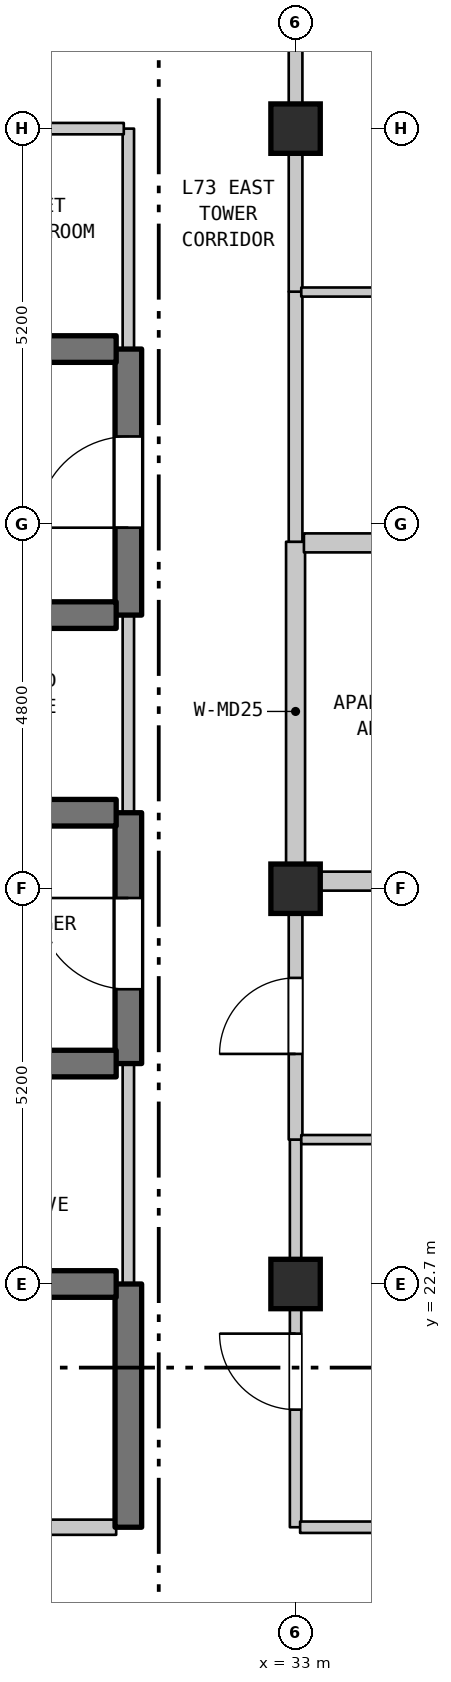
"""IFC4 building model, lengths in metres.
Left out: names, types, materials, properties, quantities, classifications, styles, units other than length and angle.
Written with IfcOpenShell. Run it as: python <this file> out.ifc"""

import sys

from ifc_helpers import new_model, si_unit, direction, frame, frame_2d, origin, origin_2d, place, context, subcontext, project, spatial, rectangle, extrude, element, fill, save


model = new_model("IFC4")
c1 = context("Model", 3, precision=1e-05, world=origin(), true_north=direction((0.0, 1.0)))
c2 = subcontext(c1, "Body", "Model", "MODEL_VIEW")
j1 = project(units=[si_unit("LENGTHUNIT", "METRE"), si_unit("PLANEANGLEUNIT", "RADIAN")], contexts=[c1])
p1 = place(None, origin())
s1 = spatial("IfcSite", under=j1, at=p1, CompositionType="ELEMENT")
p2 = place(p1, origin())
s2 = spatial("IfcBuilding", under=s1, at=p2, CompositionType="ELEMENT")
p3 = place(p2, frame((0.0, 0.0, 291.7)))
s3 = spatial("IfcBuildingStorey", under=s2, at=p3, CompositionType="ELEMENT", Elevation=291.7)
for number, where, z_axis, x_axis in (
    (1, (33.0, 22.7, 0.0), (0.0, 0.0, 1.0), (1.0, 0.0, 0.0)),
    (2, (33.0, 27.9, 0.0), (0.0, 0.0, 1.0), (1.0, 0.0, 0.0)),
    (3, (33.0, 37.9, 0.0), (0.0, 0.0, 1.0), (1.0, 0.0, 0.0)),
):
    element("IfcColumn", number, at=place(p3, frame(where, z_axis=z_axis, x_axis=x_axis)), inside=s3, PredefinedType="COLUMN", context=c2, shape_type="SweptSolid", body=[
        extrude(rectangle(XDim=0.65, YDim=0.65, at=origin_2d()), origin(), (0.0, 0.0, 1.0), 3.7),
    ])
p4 = place(p3, frame((30.8, 19.5, 0.0), z_axis=(0.0, 0.0, 1.0), x_axis=(0.0, 1.0, 0.0)))
e4 = element("IfcWall", 4, at=p4, inside=s3, PredefinedType="SHEAR", context=c2, shape_type="SweptSolid", body=[
    extrude(rectangle(XDim=3.2, YDim=0.35, at=frame_2d((1.6, 0.0))), origin(), (0.0, 0.0, 1.0), 3.39),
])
p5 = place(p3, frame((30.8, 22.7, 0.0), z_axis=(0.0, 0.0, 1.0), x_axis=(0.0, 1.0, 0.0)))
e5 = element("IfcWall", 5, at=p5, inside=s3, PredefinedType="STANDARD", context=c2, shape_type="SweptSolid", body=[
    extrude(rectangle(XDim=2.9, YDim=0.15, at=frame_2d((1.45, 0.0))), origin(), (0.0, 0.0, 1.0), 3.39),
])
p6 = place(p3, frame((30.8, 25.6, 0.0), z_axis=(0.0, 0.0, 1.0), x_axis=(0.0, 1.0, 0.0)))
e6 = element("IfcWall", 6, at=p6, inside=s3, PredefinedType="SHEAR", context=c2, shape_type="SweptSolid", body=[
    extrude(rectangle(XDim=3.3, YDim=0.35, at=frame_2d((1.65, 0.0))), origin(), (0.0, 0.0, 1.0), 3.39),
])
p7 = place(p6, frame((0.978, 0.0, 0.0)))
e7 = element("IfcOpeningElement", 7, at=p7, cuts=e6, PredefinedType="OPENING", context=c2, shape_type="SweptSolid", body=[
    extrude(rectangle(XDim=1.2, YDim=2.2, at=frame_2d((0.6, 1.1))), frame((0.0, 0.185, 0.0), z_axis=(0.0, -1.0, 0.0), x_axis=(1.0, 0.0, 0.0)), (0.0, 0.0, 1.0), 0.37),
])
p8 = place(p3, frame((30.8, 28.9, 0.0), z_axis=(0.0, 0.0, 1.0), x_axis=(0.0, 1.0, 0.0)))
e8 = element("IfcWall", 8, at=p8, inside=s3, PredefinedType="STANDARD", context=c2, shape_type="SweptSolid", body=[
    extrude(rectangle(XDim=2.6, YDim=0.15, at=frame_2d((1.3, 0.0))), origin(), (0.0, 0.0, 1.0), 3.39),
])
p9 = place(p3, frame((30.8, 31.5, 0.0), z_axis=(0.0, 0.0, 1.0), x_axis=(0.0, 1.0, 0.0)))
e9 = element("IfcWall", 9, at=p9, inside=s3, PredefinedType="SHEAR", context=c2, shape_type="SweptSolid", body=[
    extrude(rectangle(XDim=3.5, YDim=0.35, at=frame_2d((1.75, 0.0))), origin(), (0.0, 0.0, 1.0), 3.39),
])
p10 = place(p9, frame((1.15, 0.0, 0.0)))
e10 = element("IfcOpeningElement", 10, at=p10, cuts=e9, PredefinedType="OPENING", context=c2, shape_type="SweptSolid", body=[
    extrude(rectangle(XDim=1.2, YDim=2.2, at=frame_2d((0.6, 1.1))), frame((0.0, 0.185, 0.0), z_axis=(0.0, -1.0, 0.0), x_axis=(1.0, 0.0, 0.0)), (0.0, 0.0, 1.0), 0.37),
])
p11 = place(p3, frame((30.8, 35.0, 0.0), z_axis=(0.0, 0.0, 1.0), x_axis=(0.0, 1.0, 0.0)))
e11 = element("IfcWall", 11, at=p11, inside=s3, PredefinedType="STANDARD", context=c2, shape_type="SweptSolid", body=[
    extrude(rectangle(XDim=2.9, YDim=0.15, at=frame_2d((1.45, 0.0))), origin(), (0.0, 0.0, 1.0), 3.39),
])
p12 = place(p3, frame((33.0, 19.5, 0.0), z_axis=(0.0, 0.0, 1.0), x_axis=(0.0, 1.0, 0.0)))
e12 = element("IfcWall", 12, at=p12, inside=s3, PredefinedType="STANDARD", context=c2, shape_type="SweptSolid", body=[
    extrude(rectangle(XDim=5.1, YDim=0.15, at=frame_2d((2.55, 0.0))), origin(), (0.0, 0.0, 1.0), 3.1),
])
p13 = place(p12, frame((1.547, 0.0, 0.0)))
e13 = element("IfcOpeningElement", 13, at=p13, cuts=e12, PredefinedType="OPENING", context=c2, shape_type="SweptSolid", body=[
    extrude(rectangle(XDim=1.0, YDim=2.15, at=frame_2d((0.5, 1.075))), frame((0.0, 0.085, 0.0), z_axis=(0.0, -1.0, 0.0), x_axis=(1.0, 0.0, 0.0)), (0.0, 0.0, 1.0), 0.17),
])
p14 = place(p3, frame((33.0, 24.6, 0.0), z_axis=(0.0, 0.0, 1.0), x_axis=(0.0, 1.0, 0.0)))
e14 = element("IfcWall", 14, at=p14, inside=s3, PredefinedType="STANDARD", context=c2, shape_type="SweptSolid", body=[
    extrude(rectangle(XDim=3.4, YDim=0.18, at=frame_2d((1.7, 0.0))), origin(), (0.0, 0.0, 1.0), 3.1),
])
p15 = place(p14, frame((1.127, 0.0, 0.0)))
e15 = element("IfcOpeningElement", 15, at=p15, cuts=e14, PredefinedType="OPENING", context=c2, shape_type="SweptSolid", body=[
    extrude(rectangle(XDim=1.0, YDim=2.15, at=frame_2d((0.5, 1.075))), frame((0.0, 0.1, 0.0), z_axis=(0.0, -1.0, 0.0), x_axis=(1.0, 0.0, 0.0)), (0.0, 0.0, 1.0), 0.2),
])
p16 = place(p3, frame((33.0, 28.0, 0.0), z_axis=(0.0, 0.0, 1.0), x_axis=(0.0, 1.0, 0.0)))
e16 = element("IfcWall", 16, at=p16, inside=s3, PredefinedType="STANDARD", context=c2, shape_type="SweptSolid", body=[
    extrude(rectangle(XDim=4.465, YDim=0.25, at=frame_2d((2.232, 0.0))), origin(), (0.0, 0.0, 1.0), 2.89),
])
p17 = place(p3, frame((33.0, 32.465, 0.0), z_axis=(0.0, 0.0, 1.0), x_axis=(0.0, 1.0, 0.0)))
e17 = element("IfcWall", 17, at=p17, inside=s3, PredefinedType="STANDARD", context=c2, shape_type="SweptSolid", body=[
    extrude(rectangle(XDim=3.29, YDim=0.18, at=frame_2d((1.645, 0.0))), origin(), (0.0, 0.0, 1.0), 2.89),
])
p18 = place(p3, frame((33.0, 35.755, 0.0), z_axis=(0.0, 0.0, 1.0), x_axis=(0.0, 1.0, 0.0)))
e18 = element("IfcWall", 18, at=p18, inside=s3, PredefinedType="STANDARD", context=c2, shape_type="SweptSolid", body=[
    extrude(rectangle(XDim=2.145, YDim=0.18, at=frame_2d((1.073, 0.0))), origin(), (0.0, 0.0, 1.0), 2.89),
])
p19 = place(p3, frame((25.985, 19.5, 0.0), z_axis=(0.0, 0.0, 1.0), x_axis=(1.0, 0.0, 0.0)))
e19 = element("IfcWall", 19, at=p19, inside=s3, PredefinedType="STANDARD", context=c2, shape_type="SweptSolid", body=[
    extrude(rectangle(XDim=4.655, YDim=0.2, at=frame_2d((2.327, 0.0))), origin(), (0.0, 0.0, 1.0), 3.39),
])
p20 = place(p19, frame((1.845, 0.0, 0.0)))
e20 = element("IfcOpeningElement", 20, at=p20, cuts=e19, PredefinedType="OPENING", context=c2, shape_type="SweptSolid", body=[
    extrude(rectangle(XDim=0.9, YDim=2.15, at=frame_2d((0.45, 1.075))), frame((0.0, 0.11, 0.0), z_axis=(0.0, -1.0, 0.0), x_axis=(1.0, 0.0, 0.0)), (0.0, 0.0, 1.0), 0.22),
])
p21 = place(p3, frame((33.06, 19.5, 0.0), z_axis=(0.0, 0.0, 1.0), x_axis=(1.0, 0.0, 0.0)))
e21 = element("IfcWall", 21, at=p21, inside=s3, PredefinedType="STANDARD", context=c2, shape_type="SweptSolid", body=[
    extrude(rectangle(XDim=8.323, YDim=0.15, at=frame_2d((4.162, 0.0))), origin(), (0.0, 0.0, 1.0), 3.39),
])
p22 = place(p21, frame((3.583, 0.0, 0.0)))
e22 = element("IfcOpeningElement", 22, at=p22, cuts=e21, PredefinedType="OPENING", context=c2, shape_type="SweptSolid", body=[
    extrude(rectangle(XDim=1.0, YDim=2.15, at=frame_2d((0.5, 1.075))), frame((0.0, 0.085, 0.0), z_axis=(0.0, -1.0, 0.0), x_axis=(1.0, 0.0, 0.0)), (0.0, 0.0, 1.0), 0.17),
])
p23 = place(p3, frame((27.46, 22.7, 0.0), z_axis=(0.0, 0.0, 1.0), x_axis=(1.0, 0.0, 0.0)))
e23 = element("IfcWall", 23, at=p23, inside=s3, PredefinedType="SHEAR", context=c2, shape_type="SweptSolid", body=[
    extrude(rectangle(XDim=3.18, YDim=0.35, at=frame_2d((1.59, 0.0))), origin(), (0.0, 0.0, 1.0), 3.39),
])
p24 = place(p3, frame((33.075, 24.6, 0.0), z_axis=(0.0, 0.0, 1.0), x_axis=(1.0, 0.0, 0.0)))
e24 = element("IfcWall", 24, at=p24, inside=s3, PredefinedType="PARTITIONING", context=c2, shape_type="SweptSolid", body=[
    extrude(rectangle(XDim=11.448, YDim=0.12, at=frame_2d((5.724, 0.0))), origin(), (0.0, 0.0, 1.0), 3.39),
])
p25 = place(p3, frame((27.46, 25.6, 0.0), z_axis=(0.0, 0.0, 1.0), x_axis=(1.0, 0.0, 0.0)))
e25 = element("IfcWall", 25, at=p25, inside=s3, PredefinedType="SHEAR", context=c2, shape_type="SweptSolid", body=[
    extrude(rectangle(XDim=3.18, YDim=0.35, at=frame_2d((1.59, 0.0))), origin(), (0.0, 0.0, 1.0), 3.39),
])
p26 = place(p25, frame((1.115, 0.0, 0.0)))
e26 = element("IfcOpeningElement", 26, at=p26, cuts=e25, PredefinedType="OPENING", context=c2, shape_type="SweptSolid", body=[
    extrude(rectangle(XDim=0.95, YDim=2.15, at=frame_2d((0.475, 1.075))), frame((0.0, 0.185, 0.0), z_axis=(0.0, -1.0, 0.0), x_axis=(1.0, 0.0, 0.0)), (0.0, 0.0, 1.0), 0.37),
])
p27 = place(p3, frame((33.11, 28.0, 0.0), z_axis=(0.0, 0.0, 1.0), x_axis=(1.0, 0.0, 0.0)))
e27 = element("IfcWall", 27, at=p27, inside=s3, PredefinedType="STANDARD", context=c2, shape_type="SweptSolid", body=[
    extrude(rectangle(XDim=4.36, YDim=0.25, at=frame_2d((2.18, 0.0))), origin(), (0.0, 0.0, 1.0), 2.89),
])
p28 = place(p3, frame((27.46, 28.9, 0.0), z_axis=(0.0, 0.0, 1.0), x_axis=(1.0, 0.0, 0.0)))
e28 = element("IfcWall", 28, at=p28, inside=s3, PredefinedType="SHEAR", context=c2, shape_type="SweptSolid", body=[
    extrude(rectangle(XDim=3.18, YDim=0.35, at=frame_2d((1.59, 0.0))), origin(), (0.0, 0.0, 1.0), 3.39),
])
p29 = place(p28, frame((1.115, 0.0, 0.0)))
e29 = element("IfcOpeningElement", 29, at=p29, cuts=e28, PredefinedType="OPENING", context=c2, shape_type="SweptSolid", body=[
    extrude(rectangle(XDim=0.95, YDim=2.15, at=frame_2d((0.475, 1.075))), frame((0.0, 0.185, 0.0), z_axis=(0.0, -1.0, 0.0), x_axis=(1.0, 0.0, 0.0)), (0.0, 0.0, 1.0), 0.37),
])
p30 = place(p3, frame((27.46, 31.5, 0.0), z_axis=(0.0, 0.0, 1.0), x_axis=(1.0, 0.0, 0.0)))
e30 = element("IfcWall", 30, at=p30, inside=s3, PredefinedType="SHEAR", context=c2, shape_type="SweptSolid", body=[
    extrude(rectangle(XDim=3.18, YDim=0.35, at=frame_2d((1.59, 0.0))), origin(), (0.0, 0.0, 1.0), 3.39),
])
p31 = place(p3, frame((33.11, 32.45, 0.0), z_axis=(0.0, 0.0, 1.0), x_axis=(1.0, 0.0, 0.0)))
e31 = element("IfcWall", 31, at=p31, inside=s3, PredefinedType="STANDARD", context=c2, shape_type="SweptSolid", body=[
    extrude(rectangle(XDim=4.36, YDim=0.25, at=frame_2d((2.18, 0.0))), origin(), (0.0, 0.0, 1.0), 3.39),
])
p32 = place(p3, frame((26.645, 35.0, 0.0), z_axis=(0.0, 0.0, 1.0), x_axis=(1.0, 0.0, 0.0)))
e32 = element("IfcWall", 32, at=p32, inside=s3, PredefinedType="SHEAR", context=c2, shape_type="SweptSolid", body=[
    extrude(rectangle(XDim=3.995, YDim=0.35, at=frame_2d((1.998, 0.0))), origin(), (0.0, 0.0, 1.0), 3.39),
])
p33 = place(p32, frame((1.508, 0.0, 0.0)))
e33 = element("IfcOpeningElement", 33, at=p33, cuts=e32, PredefinedType="OPENING", context=c2, shape_type="SweptSolid", body=[
    extrude(rectangle(XDim=0.95, YDim=2.15, at=frame_2d((0.475, 1.075))), frame((0.0, 0.185, 0.0), z_axis=(0.0, -1.0, 0.0), x_axis=(1.0, 0.0, 0.0)), (0.0, 0.0, 1.0), 0.37),
])
p34 = place(p3, frame((33.075, 35.75, 0.0), z_axis=(0.0, 0.0, 1.0), x_axis=(1.0, 0.0, 0.0)))
e34 = element("IfcWall", 34, at=p34, inside=s3, PredefinedType="PARTITIONING", context=c2, shape_type="SweptSolid", body=[
    extrude(rectangle(XDim=4.46, YDim=0.12, at=frame_2d((2.23, 0.0))), origin(), (0.0, 0.0, 1.0), 3.39),
])
p35 = place(p3, frame((26.645, 37.9, 0.0), z_axis=(0.0, 0.0, 1.0), x_axis=(1.0, 0.0, 0.0)))
e35 = element("IfcWall", 35, at=p35, inside=s3, PredefinedType="STANDARD", context=c2, shape_type="SweptSolid", body=[
    extrude(rectangle(XDim=4.095, YDim=0.15, at=frame_2d((2.047, 0.0))), origin(), (0.0, 0.0, 1.0), 2.89),
])
p36 = place(p3, frame((33.0, 37.9, 0.0), z_axis=(0.0, 0.0, 1.0), x_axis=(0.0, 1.0, 0.0)))
e36 = element("IfcWall", 36, at=p36, inside=s3, PredefinedType="STANDARD", context=c2, shape_type="SweptSolid", body=[
    extrude(rectangle(XDim=1.85, YDim=0.18, at=frame_2d((0.925, 0.0))), origin(), (0.0, 0.0, 1.0), 2.79),
])
p37 = place(p7, origin())
e37 = element("IfcDoor", 37, at=p37, inside=s3, OperationType="SINGLE_SWING_RIGHT", PredefinedType="DOOR", context=c2, shape_type="SweptSolid", body=[
    extrude(rectangle(XDim=1.2, YDim=2.2, at=frame_2d((0.6, 1.1))), frame((0.0, 0.025, 0.0), z_axis=(0.0, -1.0, 0.0), x_axis=(1.0, 0.0, 0.0)), (0.0, 0.0, 1.0), 0.05),
])
fill(e7, e37)
p38 = place(p10, origin())
e38 = element("IfcDoor", 38, at=p38, inside=s3, OperationType="SINGLE_SWING_LEFT", PredefinedType="DOOR", context=c2, shape_type="SweptSolid", body=[
    extrude(rectangle(XDim=1.2, YDim=2.2, at=frame_2d((0.6, 1.1))), frame((0.0, 0.025, 0.0), z_axis=(0.0, -1.0, 0.0), x_axis=(1.0, 0.0, 0.0)), (0.0, 0.0, 1.0), 0.05),
])
fill(e10, e38)
p39 = place(p13, origin())
e39 = element("IfcDoor", 39, at=p39, inside=s3, OperationType="SINGLE_SWING_RIGHT", PredefinedType="DOOR", context=c2, shape_type="SweptSolid", body=[
    extrude(rectangle(XDim=1.0, YDim=2.15, at=frame_2d((0.5, 1.075))), frame((0.0, 0.025, 0.0), z_axis=(0.0, -1.0, 0.0), x_axis=(1.0, 0.0, 0.0)), (0.0, 0.0, 1.0), 0.05),
])
fill(e13, e39)
p40 = place(p15, origin())
e40 = element("IfcDoor", 40, at=p40, inside=s3, OperationType="SINGLE_SWING_LEFT", PredefinedType="DOOR", context=c2, shape_type="SweptSolid", body=[
    extrude(rectangle(XDim=1.0, YDim=2.15, at=frame_2d((0.5, 1.075))), frame((0.0, 0.025, 0.0), z_axis=(0.0, -1.0, 0.0), x_axis=(1.0, 0.0, 0.0)), (0.0, 0.0, 1.0), 0.05),
])
fill(e15, e40)
save(model, sys.argv[1])
